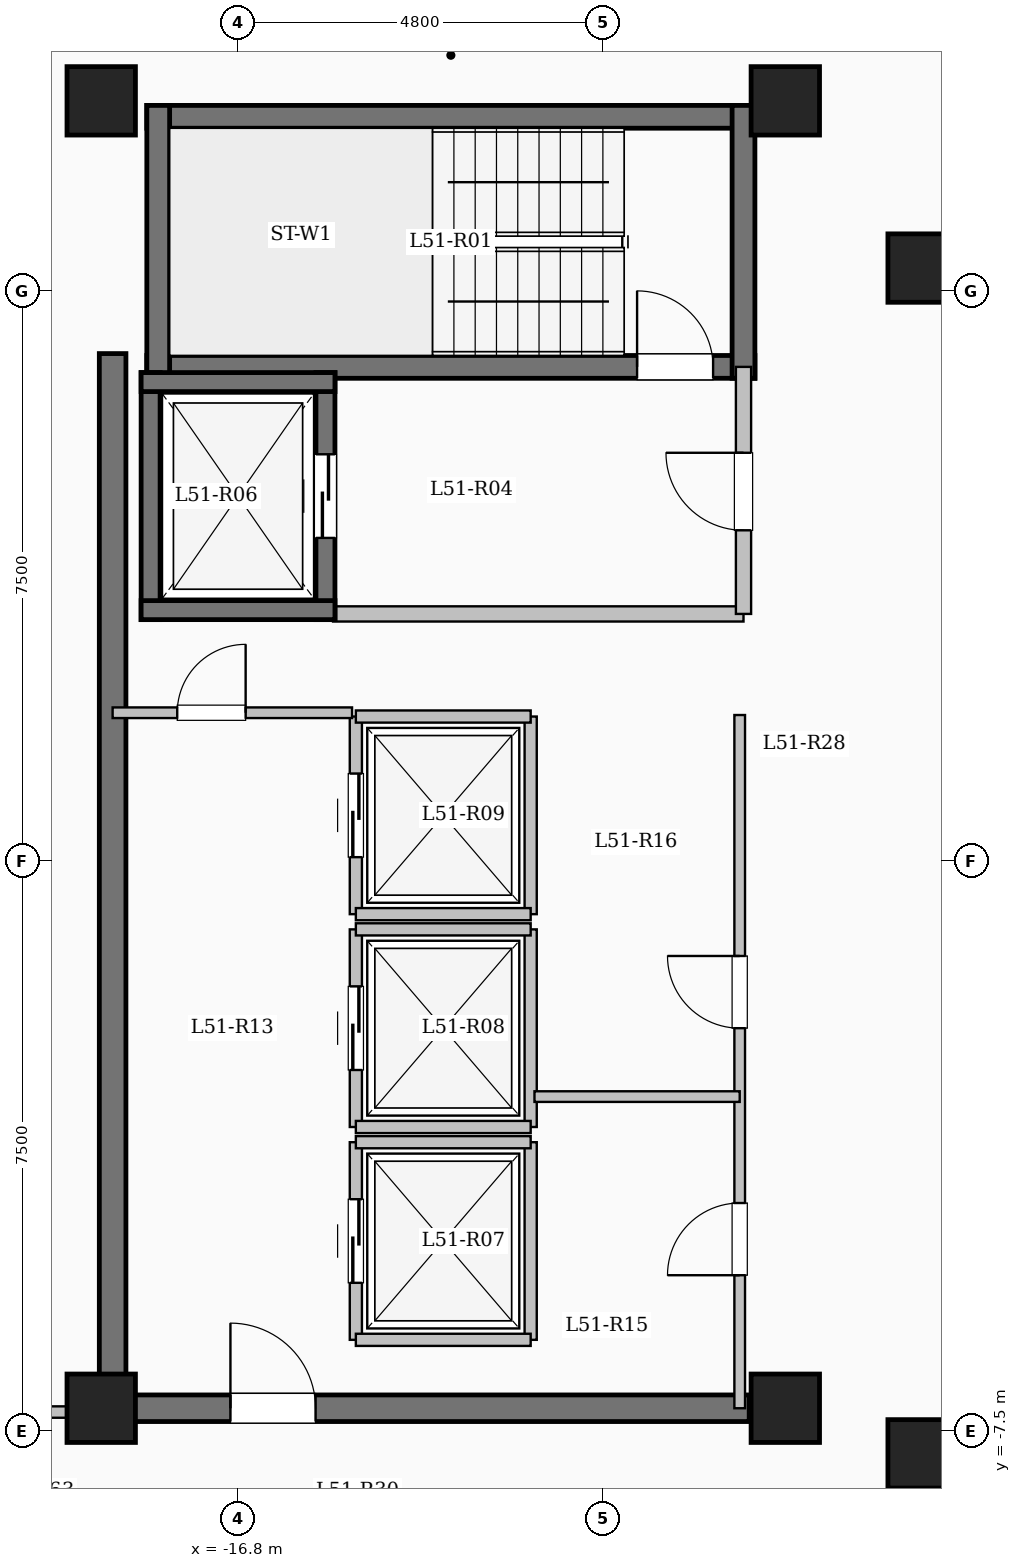
"""IFC4 building model, lengths in metres.
Left out: names, types, materials, properties, quantities, classifications, styles, units other than length and angle.
Written with IfcOpenShell. Run it as: python <this file> out.ifc"""

import sys

from ifc_helpers import new_model, si_unit, direction, frame, frame_2d, origin, origin_2d, place, context, subcontext, project, spatial, rectangle, extrude, element, fill, save


model = new_model("IFC4")
c1 = context("Model", 3, precision=1e-05, world=origin(), true_north=direction((0.0, 1.0)))
c2 = subcontext(c1, "Body", "Model", "MODEL_VIEW")
j1 = project(units=[si_unit("LENGTHUNIT", "METRE"), si_unit("PLANEANGLEUNIT", "RADIAN")], contexts=[c1])
p1 = place(None, origin())
s1 = spatial("IfcSite", under=j1, at=p1, CompositionType="ELEMENT")
p2 = place(p1, origin())
s2 = spatial("IfcBuilding", under=s1, at=p2, CompositionType="ELEMENT")
p3 = place(p2, frame((0.0, 0.0, 190.25)))
s3 = spatial("IfcBuildingStorey", under=s2, at=p3, CompositionType="ELEMENT", Elevation=190.25)
for number, where, z_axis, x_axis in (
    (1, (-7.8, -7.8, 0.0), (0.0, 0.0, 1.0), (1.0, 0.0, 0.0)),
    (2, (-7.8, 7.8, 0.0), (0.0, 0.0, 1.0), (1.0, 0.0, 0.0)),
    (3, (-9.6, -7.2, 0.0), (0.0, 0.0, 1.0), (1.0, 0.0, 0.0)),
    (4, (-9.6, 10.0, 0.0), (0.0, 0.0, 1.0), (1.0, 0.0, 0.0)),
    (5, (-18.6, -7.2, 0.0), (0.0, 0.0, 1.0), (1.0, 0.0, 0.0)),
    (6, (-18.6, 10.0, 0.0), (0.0, 0.0, 1.0), (1.0, 0.0, 0.0)),
):
    element("IfcColumn", number, at=place(p3, frame(where, z_axis=z_axis, x_axis=x_axis)), inside=s3, PredefinedType="COLUMN", context=c2, shape_type="SweptSolid", body=[
        extrude(rectangle(XDim=0.9, YDim=0.9, at=origin_2d()), origin(), (0.0, 0.0, 1.0), 3.35),
    ])
p4 = place(p3, frame((-18.0, 9.79, 0.0), z_axis=(0.0, 0.0, 1.0), x_axis=(1.0, 0.0, 0.0)))
e7 = element("IfcWall", 7, at=p4, inside=s3, PredefinedType="SHEAR", context=c2, shape_type="SweptSolid", body=[
    extrude(rectangle(XDim=8.0, YDim=0.3, at=frame_2d((4.0, 0.0))), origin(), (0.0, 0.0, 1.0), 3.35),
])
p5 = place(p3, frame((-18.0, 6.5, 0.0), z_axis=(0.0, 0.0, 1.0), x_axis=(1.0, 0.0, 0.0)))
e8 = element("IfcWall", 8, at=p5, inside=s3, PredefinedType="SHEAR", context=c2, shape_type="SweptSolid", body=[
    extrude(rectangle(XDim=8.0, YDim=0.3, at=frame_2d((4.0, 0.0))), origin(), (0.0, 0.0, 1.0), 3.35),
])
p6 = place(p5, frame((6.45, 0.0, 0.0)))
e9 = element("IfcOpeningElement", 9, at=p6, cuts=e8, PredefinedType="OPENING", context=c2, shape_type="SweptSolid", body=[
    extrude(rectangle(XDim=1.0, YDim=2.15, at=frame_2d((0.5, 1.075))), frame((0.0, 0.16, 0.0), z_axis=(0.0, -1.0, 0.0), x_axis=(1.0, 0.0, 0.0)), (0.0, 0.0, 1.0), 0.32),
])
for number, where, z_axis, x_axis in (
    (10, (-17.85, 6.35, 0.0), (0.0, 0.0, 1.0), (0.0, 1.0, 0.0)),
    (11, (-10.15, 6.35, 0.0), (0.0, 0.0, 1.0), (0.0, 1.0, 0.0)),
):
    element("IfcWall", number, at=place(p3, frame(where, z_axis=z_axis, x_axis=x_axis)), inside=s3, PredefinedType="SHEAR", context=c2, shape_type="SweptSolid", body=[
        extrude(rectangle(XDim=3.59, YDim=0.3, at=frame_2d((1.795, 0.0))), origin(), (0.0, 0.0, 1.0), 3.35),
    ])
p7 = place(p3, frame((-15.55, 3.25, 0.0), z_axis=(0.0, 0.0, 1.0), x_axis=(1.0, 0.0, 0.0)))
e12 = element("IfcWall", 12, at=p7, inside=s3, PredefinedType="SOLIDWALL", context=c2, shape_type="SweptSolid", body=[
    extrude(rectangle(XDim=5.4, YDim=0.2, at=frame_2d((2.7, 0.0))), origin(), (0.0, 0.0, 1.0), 3.1),
])
p8 = place(p3, frame((-10.15, 3.25, 0.0), z_axis=(0.0, 0.0, 1.0), x_axis=(0.0, 1.0, 0.0)))
e13 = element("IfcWall", 13, at=p8, inside=s3, PredefinedType="SOLIDWALL", context=c2, shape_type="SweptSolid", body=[
    extrude(rectangle(XDim=3.25, YDim=0.2, at=frame_2d((1.625, 0.0))), origin(), (0.0, 0.0, 1.0), 3.1),
])
p9 = place(p8, frame((1.1, 0.0, 0.0)))
e14 = element("IfcOpeningElement", 14, at=p9, cuts=e13, PredefinedType="OPENING", context=c2, shape_type="SweptSolid", body=[
    extrude(rectangle(XDim=1.02, YDim=2.15, at=frame_2d((0.51, 1.075))), frame((0.0, 0.11, 0.0), z_axis=(0.0, -1.0, 0.0), x_axis=(1.0, 0.0, 0.0)), (0.0, 0.0, 1.0), 0.22),
])
p10 = place(p3, frame((-17.95, 3.175, 0.0), z_axis=(0.0, 0.0, 1.0), x_axis=(0.0, 1.0, 0.0)))
e15 = element("IfcWall", 15, at=p10, inside=s3, PredefinedType="SHEAR", context=c2, shape_type="SweptSolid", body=[
    extrude(rectangle(XDim=3.25, YDim=0.25, at=frame_2d((1.625, 0.0))), origin(), (0.0, 0.0, 1.0), 3.35),
])
p11 = place(p3, frame((-15.65, 3.175, 0.0), z_axis=(0.0, 0.0, 1.0), x_axis=(0.0, 1.0, 0.0)))
e16 = element("IfcWall", 16, at=p11, inside=s3, PredefinedType="SHEAR", context=c2, shape_type="SweptSolid", body=[
    extrude(rectangle(XDim=3.25, YDim=0.25, at=frame_2d((1.625, 0.0))), origin(), (0.0, 0.0, 1.0), 3.35),
])
p12 = place(p11, frame((1.075, 0.0, 0.0)))
e17 = element("IfcOpeningElement", 17, at=p12, cuts=e16, PredefinedType="OPENING", context=c2, shape_type="SweptSolid", body=[
    extrude(rectangle(XDim=1.1, YDim=2.15, at=frame_2d((0.55, 1.075))), frame((0.0, 0.135, 0.0), z_axis=(0.0, -1.0, 0.0), x_axis=(1.0, 0.0, 0.0)), (0.0, 0.0, 1.0), 0.27),
])
for number, where, z_axis, x_axis in (
    (18, (-18.075, 3.3, 0.0), (0.0, 0.0, 1.0), (1.0, 0.0, 0.0)),
    (19, (-18.075, 6.3, 0.0), (0.0, 0.0, 1.0), (1.0, 0.0, 0.0)),
):
    element("IfcWall", number, at=place(p3, frame(where, z_axis=z_axis, x_axis=x_axis)), inside=s3, PredefinedType="SHEAR", context=c2, shape_type="SweptSolid", body=[
        extrude(rectangle(XDim=2.55, YDim=0.25, at=frame_2d((1.275, 0.0))), origin(), (0.0, 0.0, 1.0), 3.35),
    ])
p13 = place(p3, frame((-15.25, -6.3, 0.0), z_axis=(0.0, 0.0, 1.0), x_axis=(0.0, 1.0, 0.0)))
e20 = element("IfcWall", 20, at=p13, inside=s3, PredefinedType="SOLIDWALL", context=c2, shape_type="SweptSolid", body=[
    extrude(rectangle(XDim=2.6, YDim=0.16, at=frame_2d((1.3, 0.0))), origin(), (0.0, 0.0, 1.0), 3.1),
])
p14 = place(p13, frame((0.75, 0.0, 0.0)))
e21 = element("IfcOpeningElement", 21, at=p14, cuts=e20, PredefinedType="OPENING", context=c2, shape_type="SweptSolid", body=[
    extrude(rectangle(XDim=1.1, YDim=2.15, at=frame_2d((0.55, 1.075))), frame((0.0, 0.09, 0.0), z_axis=(0.0, -1.0, 0.0), x_axis=(1.0, 0.0, 0.0)), (0.0, 0.0, 1.0), 0.18),
])
p15 = place(p3, frame((-12.95, -6.3, 0.0), z_axis=(0.0, 0.0, 1.0), x_axis=(0.0, 1.0, 0.0)))
e22 = element("IfcWall", 22, at=p15, inside=s3, PredefinedType="SOLIDWALL", context=c2, shape_type="SweptSolid", body=[
    extrude(rectangle(XDim=2.6, YDim=0.16, at=frame_2d((1.3, 0.0))), origin(), (0.0, 0.0, 1.0), 3.1),
])
for number, where, z_axis, x_axis in (
    (23, (-15.25, -6.3, 0.0), (0.0, 0.0, 1.0), (1.0, 0.0, 0.0)),
    (24, (-15.25, -3.7, 0.0), (0.0, 0.0, 1.0), (1.0, 0.0, 0.0)),
):
    element("IfcWall", number, at=place(p3, frame(where, z_axis=z_axis, x_axis=x_axis)), inside=s3, PredefinedType="SOLIDWALL", context=c2, shape_type="SweptSolid", body=[
        extrude(rectangle(XDim=2.3, YDim=0.16, at=frame_2d((1.15, 0.0))), origin(), (0.0, 0.0, 1.0), 3.1),
    ])
p16 = place(p3, frame((-15.25, -3.5, 0.0), z_axis=(0.0, 0.0, 1.0), x_axis=(0.0, 1.0, 0.0)))
e25 = element("IfcWall", 25, at=p16, inside=s3, PredefinedType="SOLIDWALL", context=c2, shape_type="SweptSolid", body=[
    extrude(rectangle(XDim=2.6, YDim=0.16, at=frame_2d((1.3, 0.0))), origin(), (0.0, 0.0, 1.0), 3.1),
])
p17 = place(p16, frame((0.75, 0.0, 0.0)))
e26 = element("IfcOpeningElement", 26, at=p17, cuts=e25, PredefinedType="OPENING", context=c2, shape_type="SweptSolid", body=[
    extrude(rectangle(XDim=1.1, YDim=2.15, at=frame_2d((0.55, 1.075))), frame((0.0, 0.09, 0.0), z_axis=(0.0, -1.0, 0.0), x_axis=(1.0, 0.0, 0.0)), (0.0, 0.0, 1.0), 0.18),
])
p18 = place(p3, frame((-12.95, -3.5, 0.0), z_axis=(0.0, 0.0, 1.0), x_axis=(0.0, 1.0, 0.0)))
e27 = element("IfcWall", 27, at=p18, inside=s3, PredefinedType="SOLIDWALL", context=c2, shape_type="SweptSolid", body=[
    extrude(rectangle(XDim=2.6, YDim=0.16, at=frame_2d((1.3, 0.0))), origin(), (0.0, 0.0, 1.0), 3.1),
])
for number, where, z_axis, x_axis in (
    (28, (-15.25, -3.5, 0.0), (0.0, 0.0, 1.0), (1.0, 0.0, 0.0)),
    (29, (-15.25, -0.9, 0.0), (0.0, 0.0, 1.0), (1.0, 0.0, 0.0)),
):
    element("IfcWall", number, at=place(p3, frame(where, z_axis=z_axis, x_axis=x_axis)), inside=s3, PredefinedType="SOLIDWALL", context=c2, shape_type="SweptSolid", body=[
        extrude(rectangle(XDim=2.3, YDim=0.16, at=frame_2d((1.15, 0.0))), origin(), (0.0, 0.0, 1.0), 3.1),
    ])
p19 = place(p3, frame((-15.25, -0.7, 0.0), z_axis=(0.0, 0.0, 1.0), x_axis=(0.0, 1.0, 0.0)))
e30 = element("IfcWall", 30, at=p19, inside=s3, PredefinedType="SOLIDWALL", context=c2, shape_type="SweptSolid", body=[
    extrude(rectangle(XDim=2.6, YDim=0.16, at=frame_2d((1.3, 0.0))), origin(), (0.0, 0.0, 1.0), 3.1),
])
p20 = place(p19, frame((0.75, 0.0, 0.0)))
e31 = element("IfcOpeningElement", 31, at=p20, cuts=e30, PredefinedType="OPENING", context=c2, shape_type="SweptSolid", body=[
    extrude(rectangle(XDim=1.1, YDim=2.15, at=frame_2d((0.55, 1.075))), frame((0.0, 0.09, 0.0), z_axis=(0.0, -1.0, 0.0), x_axis=(1.0, 0.0, 0.0)), (0.0, 0.0, 1.0), 0.18),
])
p21 = place(p3, frame((-12.95, -0.7, 0.0), z_axis=(0.0, 0.0, 1.0), x_axis=(0.0, 1.0, 0.0)))
e32 = element("IfcWall", 32, at=p21, inside=s3, PredefinedType="SOLIDWALL", context=c2, shape_type="SweptSolid", body=[
    extrude(rectangle(XDim=2.6, YDim=0.16, at=frame_2d((1.3, 0.0))), origin(), (0.0, 0.0, 1.0), 3.1),
])
for number, where, z_axis, x_axis in (
    (33, (-15.25, -0.7, 0.0), (0.0, 0.0, 1.0), (1.0, 0.0, 0.0)),
    (34, (-15.25, 1.9, 0.0), (0.0, 0.0, 1.0), (1.0, 0.0, 0.0)),
):
    element("IfcWall", number, at=place(p3, frame(where, z_axis=z_axis, x_axis=x_axis)), inside=s3, PredefinedType="SOLIDWALL", context=c2, shape_type="SweptSolid", body=[
        extrude(rectangle(XDim=2.3, YDim=0.16, at=frame_2d((1.15, 0.0))), origin(), (0.0, 0.0, 1.0), 3.1),
    ])
p22 = place(p3, frame((-18.45, -7.375, 0.0), z_axis=(0.0, 0.0, 1.0), x_axis=(0.0, 1.0, 0.0)))
e35 = element("IfcWall", 35, at=p22, inside=s3, PredefinedType="SHEAR", context=c2, shape_type="SweptSolid", body=[
    extrude(rectangle(XDim=14.05, YDim=0.35, at=frame_2d((7.025, 0.0))), origin(), (0.0, 0.0, 1.0), 3.35),
])
p23 = place(p3, frame((-18.625, -7.2, 0.0), z_axis=(0.0, 0.0, 1.0), x_axis=(1.0, 0.0, 0.0)))
e36 = element("IfcWall", 36, at=p23, inside=s3, PredefinedType="SHEAR", context=c2, shape_type="SweptSolid", body=[
    extrude(rectangle(XDim=8.55, YDim=0.35, at=frame_2d((4.275, 0.0))), origin(), (0.0, 0.0, 1.0), 3.35),
])
p24 = place(p23, frame((1.725, 0.0, 0.0)))
e37 = element("IfcOpeningElement", 37, at=p24, cuts=e36, PredefinedType="OPENING", context=c2, shape_type="SweptSolid", body=[
    extrude(rectangle(XDim=1.12, YDim=2.15, at=frame_2d((0.56, 1.075))), frame((0.0, 0.185, 0.0), z_axis=(0.0, -1.0, 0.0), x_axis=(1.0, 0.0, 0.0)), (0.0, 0.0, 1.0), 0.37),
])
p25 = place(p3, frame((-18.45, 1.95, 0.0), z_axis=(0.0, 0.0, 1.0), x_axis=(1.0, 0.0, 0.0)))
e38 = element("IfcWall", 38, at=p25, inside=s3, PredefinedType="PARTITIONING", context=c2, shape_type="SweptSolid", body=[
    extrude(rectangle(XDim=3.15, YDim=0.14, at=frame_2d((1.575, 0.0))), origin(), (0.0, 0.0, 1.0), 3.1),
])
p26 = place(p25, frame((0.85, 0.0, 0.0)))
e39 = element("IfcOpeningElement", 39, at=p26, cuts=e38, PredefinedType="OPENING", context=c2, shape_type="SweptSolid", body=[
    extrude(rectangle(XDim=0.9, YDim=2.08, at=frame_2d((0.45, 1.04))), frame((0.0, 0.08, 0.0), z_axis=(0.0, -1.0, 0.0), x_axis=(1.0, 0.0, 0.0)), (0.0, 0.0, 1.0), 0.16),
])
p27 = place(p3, frame((-10.2, -7.2, 0.0), z_axis=(0.0, 0.0, 1.0), x_axis=(0.0, 1.0, 0.0)))
e40 = element("IfcWall", 40, at=p27, inside=s3, PredefinedType="PARTITIONING", context=c2, shape_type="SweptSolid", body=[
    extrude(rectangle(XDim=9.12, YDim=0.14, at=frame_2d((4.56, 0.0))), origin(), (0.0, 0.0, 1.0), 3.1),
])
p28 = place(p27, frame((1.75, 0.0, 0.0)))
e41 = element("IfcOpeningElement", 41, at=p28, cuts=e40, PredefinedType="OPENING", context=c2, shape_type="SweptSolid", body=[
    extrude(rectangle(XDim=0.95, YDim=2.12, at=frame_2d((0.475, 1.06))), frame((0.0, 0.08, 0.0), z_axis=(0.0, -1.0, 0.0), x_axis=(1.0, 0.0, 0.0)), (0.0, 0.0, 1.0), 0.16),
])
p29 = place(p27, frame((5.0, 0.0, 0.0)))
e42 = element("IfcOpeningElement", 42, at=p29, cuts=e40, PredefinedType="OPENING", context=c2, shape_type="SweptSolid", body=[
    extrude(rectangle(XDim=0.95, YDim=2.12, at=frame_2d((0.475, 1.06))), frame((0.0, 0.08, 0.0), z_axis=(0.0, -1.0, 0.0), x_axis=(1.0, 0.0, 0.0)), (0.0, 0.0, 1.0), 0.16),
])
p30 = place(p3, frame((-12.9, -3.1, 0.0), z_axis=(0.0, 0.0, 1.0), x_axis=(1.0, 0.0, 0.0)))
e43 = element("IfcWall", 43, at=p30, inside=s3, PredefinedType="PARTITIONING", context=c2, shape_type="SweptSolid", body=[
    extrude(rectangle(XDim=2.7, YDim=0.14, at=frame_2d((1.35, 0.0))), origin(), (0.0, 0.0, 1.0), 3.1),
])
p31 = place(p3, frame((-23.58, -7.25, 0.0), z_axis=(0.0, 0.0, 1.0), x_axis=(1.0, 0.0, 0.0)))
e44 = element("IfcWall", 44, at=p31, inside=s3, PredefinedType="PARTITIONING", context=c2, shape_type="SweptSolid", body=[
    extrude(rectangle(XDim=5.13, YDim=0.15, at=frame_2d((2.565, 0.0))), origin(), (0.0, 0.0, 1.0), 3.1),
])
p32 = place(p31, frame((2.08, 0.0, 0.0)))
e45 = element("IfcOpeningElement", 45, at=p32, cuts=e44, PredefinedType="OPENING", context=c2, shape_type="SweptSolid", body=[
    extrude(rectangle(XDim=1.08, YDim=2.15, at=frame_2d((0.54, 1.075))), frame((0.0, 0.085, 0.0), z_axis=(0.0, -1.0, 0.0), x_axis=(1.0, 0.0, 0.0)), (0.0, 0.0, 1.0), 0.17),
])
p33 = place(p6, origin())
e46 = element("IfcDoor", 46, at=p33, inside=s3, OperationType="SINGLE_SWING_LEFT", PredefinedType="DOOR", context=c2, shape_type="SweptSolid", body=[
    extrude(rectangle(XDim=1.0, YDim=2.15, at=frame_2d((0.5, 1.075))), frame((0.0, 0.025, 0.0), z_axis=(0.0, -1.0, 0.0), x_axis=(1.0, 0.0, 0.0)), (0.0, 0.0, 1.0), 0.05),
])
fill(e9, e46)
p34 = place(p9, origin())
e47 = element("IfcDoor", 47, at=p34, inside=s3, OperationType="SINGLE_SWING_RIGHT", PredefinedType="DOOR", context=c2, shape_type="SweptSolid", body=[
    extrude(rectangle(XDim=1.02, YDim=2.15, at=frame_2d((0.51, 1.075))), frame((0.0, 0.025, 0.0), z_axis=(0.0, -1.0, 0.0), x_axis=(1.0, 0.0, 0.0)), (0.0, 0.0, 1.0), 0.05),
])
fill(e14, e47)
p35 = place(p12, origin())
e48 = element("IfcDoor", 48, at=p35, inside=s3, OperationType="SLIDING_TO_LEFT", PredefinedType="DOOR", context=c2, shape_type="SweptSolid", body=[
    extrude(rectangle(XDim=1.1, YDim=2.15, at=frame_2d((0.55, 1.075))), frame((0.0, 0.025, 0.0), z_axis=(0.0, -1.0, 0.0), x_axis=(1.0, 0.0, 0.0)), (0.0, 0.0, 1.0), 0.05),
])
fill(e17, e48)
p36 = place(p14, origin())
e49 = element("IfcDoor", 49, at=p36, inside=s3, OperationType="SLIDING_TO_LEFT", PredefinedType="DOOR", context=c2, shape_type="SweptSolid", body=[
    extrude(rectangle(XDim=1.1, YDim=2.15, at=frame_2d((0.55, 1.075))), frame((0.0, 0.025, 0.0), z_axis=(0.0, -1.0, 0.0), x_axis=(1.0, 0.0, 0.0)), (0.0, 0.0, 1.0), 0.05),
])
fill(e21, e49)
p37 = place(p17, origin())
e50 = element("IfcDoor", 50, at=p37, inside=s3, OperationType="SLIDING_TO_LEFT", PredefinedType="DOOR", context=c2, shape_type="SweptSolid", body=[
    extrude(rectangle(XDim=1.1, YDim=2.15, at=frame_2d((0.55, 1.075))), frame((0.0, 0.025, 0.0), z_axis=(0.0, -1.0, 0.0), x_axis=(1.0, 0.0, 0.0)), (0.0, 0.0, 1.0), 0.05),
])
fill(e26, e50)
p38 = place(p20, origin())
e51 = element("IfcDoor", 51, at=p38, inside=s3, OperationType="SLIDING_TO_LEFT", PredefinedType="DOOR", context=c2, shape_type="SweptSolid", body=[
    extrude(rectangle(XDim=1.1, YDim=2.15, at=frame_2d((0.55, 1.075))), frame((0.0, 0.025, 0.0), z_axis=(0.0, -1.0, 0.0), x_axis=(1.0, 0.0, 0.0)), (0.0, 0.0, 1.0), 0.05),
])
fill(e31, e51)
p39 = place(p24, origin())
e52 = element("IfcDoor", 52, at=p39, inside=s3, OperationType="SINGLE_SWING_LEFT", PredefinedType="DOOR", context=c2, shape_type="SweptSolid", body=[
    extrude(rectangle(XDim=1.12, YDim=2.15, at=frame_2d((0.56, 1.075))), frame((0.0, 0.025, 0.0), z_axis=(0.0, -1.0, 0.0), x_axis=(1.0, 0.0, 0.0)), (0.0, 0.0, 1.0), 0.05),
])
fill(e37, e52)
p40 = place(p26, origin())
e53 = element("IfcDoor", 53, at=p40, inside=s3, OperationType="SINGLE_SWING_RIGHT", PredefinedType="DOOR", context=c2, shape_type="SweptSolid", body=[
    extrude(rectangle(XDim=0.9, YDim=2.08, at=frame_2d((0.45, 1.04))), frame((0.0, 0.025, 0.0), z_axis=(0.0, -1.0, 0.0), x_axis=(1.0, 0.0, 0.0)), (0.0, 0.0, 1.0), 0.05),
])
fill(e39, e53)
p41 = place(p28, origin())
e54 = element("IfcDoor", 54, at=p41, inside=s3, OperationType="SINGLE_SWING_LEFT", PredefinedType="DOOR", context=c2, shape_type="SweptSolid", body=[
    extrude(rectangle(XDim=0.95, YDim=2.12, at=frame_2d((0.475, 1.06))), frame((0.0, 0.025, 0.0), z_axis=(0.0, -1.0, 0.0), x_axis=(1.0, 0.0, 0.0)), (0.0, 0.0, 1.0), 0.05),
])
fill(e41, e54)
p42 = place(p29, origin())
e55 = element("IfcDoor", 55, at=p42, inside=s3, OperationType="SINGLE_SWING_RIGHT", PredefinedType="DOOR", context=c2, shape_type="SweptSolid", body=[
    extrude(rectangle(XDim=0.95, YDim=2.12, at=frame_2d((0.475, 1.06))), frame((0.0, 0.025, 0.0), z_axis=(0.0, -1.0, 0.0), x_axis=(1.0, 0.0, 0.0)), (0.0, 0.0, 1.0), 0.05),
])
fill(e42, e55)
save(model, sys.argv[1])
